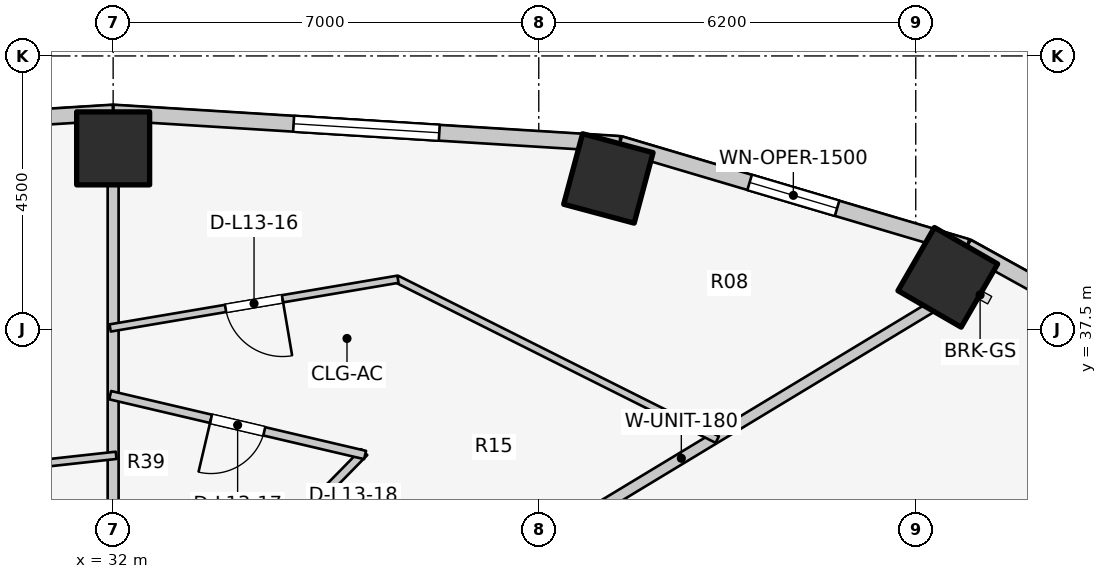
"""IFC4 building model, lengths in metres.
Left out: names, types, materials, properties, quantities, classifications, styles, units other than length and angle.
Written with IfcOpenShell. Run it as: python <this file> out.ifc"""

import sys

from ifc_helpers import new_model, si_unit, direction, frame, frame_2d, origin, origin_2d, place, context, subcontext, project, spatial, rectangle, extrude, element, fill, save


model = new_model("IFC4")
c1 = context("Model", 3, precision=1e-05, world=origin(), true_north=direction((0.0, 1.0)))
c2 = subcontext(c1, "Body", "Model", "MODEL_VIEW")
j1 = project(units=[si_unit("LENGTHUNIT", "METRE"), si_unit("PLANEANGLEUNIT", "RADIAN")], contexts=[c1])
p1 = place(None, origin())
s1 = spatial("IfcSite", under=j1, at=p1, CompositionType="ELEMENT")
p2 = place(p1, origin())
s2 = spatial("IfcBuilding", under=s1, at=p2, CompositionType="ELEMENT")
p3 = place(p2, frame((0.0, 0.0, 46.2)))
s3 = spatial("IfcBuildingStorey", under=s2, at=p3, CompositionType="ELEMENT", Elevation=46.2)
for number, where, z_axis, x_axis in (
    (1, (45.727, 38.359, 0.0), (0.0, 0.0, 1.0), (0.5, 0.866, 0.0)),
    (2, (40.145, 39.986, 0.0), (0.0, 0.0, 1.0), (0.259, 0.966, 0.0)),
    (3, (32.0, 40.48, 0.0), (0.0, 0.0, 1.0), (0.0, 1.0, 0.0)),
):
    element("IfcColumn", number, at=place(p3, frame(where, z_axis=z_axis, x_axis=x_axis)), inside=s3, PredefinedType="COLUMN", context=c2, shape_type="SweptSolid", body=[
        extrude(rectangle(XDim=1.2, YDim=1.2, at=origin_2d()), origin(), (0.0, 0.0, 1.0), 3.1),
    ])
p4 = place(p3, frame((50.405, 36.45, 0.0), z_axis=(0.0, 0.0, 1.0), x_axis=(-0.875137303239, 0.483874674352, 0.0)))
e4 = element("IfcWall", 4, at=p4, inside=s3, PredefinedType="STANDARD", context=c2, shape_type="SweptSolid", body=[
    extrude(rectangle(XDim=4.985, YDim=0.26, at=frame_2d((2.493, 0.0))), origin(), (0.0, 0.0, 1.0), 2.85),
])
p5 = place(p3, frame((46.042, 38.862, 0.0), z_axis=(0.0, 0.0, 1.0), x_axis=(-0.958843593522, 0.283934786811, 0.0)))
e5 = element("IfcWall", 5, at=p5, inside=s3, PredefinedType="STANDARD", context=c2, shape_type="SweptSolid", body=[
    extrude(rectangle(XDim=5.955, YDim=0.26, at=frame_2d((2.978, 0.0))), origin(), (0.0, 0.0, 1.0), 2.85),
])
p6 = place(p5, frame((2.228, 0.0, 0.75)))
e6 = element("IfcOpeningElement", 6, at=p6, cuts=e5, PredefinedType="OPENING", context=c2, shape_type="SweptSolid", body=[
    extrude(rectangle(XDim=1.5, YDim=1.6, at=frame_2d((0.75, 0.8))), frame((0.0, 0.14, 0.0), z_axis=(0.0, -1.0, 0.0), x_axis=(1.0, 0.0, 0.0)), (0.0, 0.0, 1.0), 0.28),
])
p7 = place(p3, frame((40.332, 40.553, 0.0), z_axis=(0.0, 0.0, 1.0), x_axis=(-0.998090514779, 0.061768311519, 0.0)))
e7 = element("IfcWall", 7, at=p7, inside=s3, PredefinedType="STANDARD", context=c2, shape_type="SweptSolid", body=[
    extrude(rectangle(XDim=8.348, YDim=0.26, at=frame_2d((4.174, 0.0))), origin(), (0.0, 0.0, 1.0), 2.85),
])
p8 = place(p7, frame((2.974, 0.0, 0.75)))
e8 = element("IfcOpeningElement", 8, at=p8, cuts=e7, PredefinedType="OPENING", context=c2, shape_type="SweptSolid", body=[
    extrude(rectangle(XDim=2.4, YDim=1.7, at=frame_2d((1.2, 0.85))), frame((0.0, 0.14, 0.0), z_axis=(0.0, -1.0, 0.0), x_axis=(1.0, 0.0, 0.0)), (0.0, 0.0, 1.0), 0.28),
])
p9 = place(p3, frame((32.0, 41.069, 0.0), z_axis=(0.0, 0.0, 1.0), x_axis=(-0.998090514779, -0.061768311519, 0.0)))
e9 = element("IfcWall", 9, at=p9, inside=s3, PredefinedType="STANDARD", context=c2, shape_type="SweptSolid", body=[
    extrude(rectangle(XDim=8.348, YDim=0.26, at=frame_2d((4.174, 0.0))), origin(), (0.0, 0.0, 1.0), 2.85),
])
p10 = place(p9, frame((3.424, 0.0, 0.75)))
e10 = element("IfcOpeningElement", 10, at=p10, cuts=e9, PredefinedType="OPENING", context=c2, shape_type="SweptSolid", body=[
    extrude(rectangle(XDim=1.5, YDim=1.6, at=frame_2d((0.75, 0.8))), frame((0.0, 0.14, 0.0), z_axis=(0.0, -1.0, 0.0), x_axis=(1.0, 0.0, 0.0)), (0.0, 0.0, 1.0), 0.28),
])
p11 = place(p3, frame((37.252, 32.91, 0.0), z_axis=(0.0, 0.0, 1.0), x_axis=(0.855817136021, 0.517278483694, 0.0)))
e11 = element("IfcWall", 11, at=p11, inside=s3, PredefinedType="PARTITIONING", context=c2, shape_type="SweptSolid", body=[
    extrude(rectangle(XDim=9.564, YDim=0.18, at=frame_2d((4.782, 0.0))), origin(), (0.0, 0.0, 1.0), 2.237),
])
p12 = place(p3, frame((32.0, 34.465, 0.0), z_axis=(0.0, 0.0, 1.0), x_axis=(0.0, 1.0, 0.0)))
e12 = element("IfcWall", 12, at=p12, inside=s3, PredefinedType="PARTITIONING", context=c2, shape_type="SweptSolid", body=[
    extrude(rectangle(XDim=5.435, YDim=0.18, at=frame_2d((2.717, 0.0))), origin(), (0.0, 0.0, 1.0), 2.237),
])
p13 = place(p3, frame((41.936, 35.691, 0.0), z_axis=(0.0, 0.0, 1.0), x_axis=(-0.894128783551, 0.447809913274, 0.0)))
e13 = element("IfcWall", 13, at=p13, inside=s3, PredefinedType="MOVABLE", context=c2, shape_type="SweptSolid", body=[
    extrude(rectangle(XDim=5.895, YDim=0.12, at=frame_2d((2.947, 0.0))), origin(), (0.0, 0.0, 1.0), 2.237),
])
p14 = place(p3, frame((36.684, 38.328, 0.0), z_axis=(0.0, 0.0, 1.0), x_axis=(-0.985971487104, -0.166913829921, 0.0)))
e14 = element("IfcWall", 14, at=p14, inside=s3, PredefinedType="MOVABLE", context=c2, shape_type="SweptSolid", body=[
    extrude(rectangle(XDim=4.801, YDim=0.12, at=frame_2d((2.4, 0.0))), origin(), (0.0, 0.0, 1.0), 2.237),
])
p15 = place(p14, frame((1.925, 0.0, 0.0)))
e15 = element("IfcOpeningElement", 15, at=p15, cuts=e14, PredefinedType="OPENING", context=c2, shape_type="SweptSolid", body=[
    extrude(rectangle(XDim=0.95, YDim=2.1, at=frame_2d((0.475, 1.05))), frame((0.0, 0.07, 0.0), z_axis=(0.0, -1.0, 0.0), x_axis=(1.0, 0.0, 0.0)), (0.0, 0.0, 1.0), 0.14),
])
p16 = place(p3, frame((34.659, 33.986, 0.0), z_axis=(0.0, 0.0, 1.0), x_axis=(0.700331728855, 0.713817532398, 0.0)))
e16 = element("IfcWall", 16, at=p16, inside=s3, PredefinedType="PLUMBINGWALL", context=c2, shape_type="SweptSolid", body=[
    extrude(rectangle(XDim=2.1, YDim=0.14, at=frame_2d((1.05, 0.0))), origin(), (0.0, 0.0, 1.0), 2.385),
])
p17 = place(p3, frame((36.144, 35.438, 0.0), z_axis=(0.0, 0.0, 1.0), x_axis=(-0.973546394015, 0.228489427982, 0.0)))
e17 = element("IfcWall", 17, at=p17, inside=s3, PredefinedType="PLUMBINGWALL", context=c2, shape_type="SweptSolid", body=[
    extrude(rectangle(XDim=4.306, YDim=0.14, at=frame_2d((2.153, 0.0))), origin(), (0.0, 0.0, 1.0), 2.237),
])
p18 = place(p17, frame((1.703, 0.0, 0.0)))
e18 = element("IfcOpeningElement", 18, at=p18, cuts=e17, PredefinedType="OPENING", context=c2, shape_type="SweptSolid", body=[
    extrude(rectangle(XDim=0.9, YDim=2.1, at=frame_2d((0.45, 1.05))), frame((0.0, 0.08, 0.0), z_axis=(0.0, -1.0, 0.0), x_axis=(1.0, 0.0, 0.0)), (0.0, 0.0, 1.0), 0.16),
])
p19 = place(p3, frame((32.05, 35.432, 0.0), z_axis=(0.0, 0.0, 1.0), x_axis=(-0.993997647441, -0.109401448263, 0.0)))
e19 = element("IfcWall", 19, at=p19, inside=s3, PredefinedType="MOVABLE", context=c2, shape_type="SweptSolid", body=[
    extrude(rectangle(XDim=3.798, YDim=0.12, at=frame_2d((1.899, 0.0))), origin(), (0.0, 0.0, 1.0), 2.237),
])
p20 = place(p19, frame((1.424, 0.0, 0.0)))
e20 = element("IfcOpeningElement", 20, at=p20, cuts=e19, PredefinedType="OPENING", context=c2, shape_type="SweptSolid", body=[
    extrude(rectangle(XDim=0.95, YDim=2.1, at=frame_2d((0.475, 1.05))), frame((0.0, 0.07, 0.0), z_axis=(0.0, -1.0, 0.0), x_axis=(1.0, 0.0, 0.0)), (0.0, 0.0, 1.0), 0.14),
])
p21 = place(p6, origin())
e21 = element("IfcWindow", 21, at=p21, inside=s3, PartitioningType="SINGLE_PANEL", PredefinedType="WINDOW", context=c2, shape_type="SweptSolid", body=[
    extrude(rectangle(XDim=1.5, YDim=1.6, at=frame_2d((0.75, 0.8))), frame((0.0, 0.03, 0.0), z_axis=(0.0, -1.0, 0.0), x_axis=(1.0, 0.0, 0.0)), (0.0, 0.0, 1.0), 0.06),
])
fill(e6, e21)
p22 = place(p8, origin())
e22 = element("IfcWindow", 22, at=p22, inside=s3, PartitioningType="SINGLE_PANEL", PredefinedType="WINDOW", context=c2, shape_type="SweptSolid", body=[
    extrude(rectangle(XDim=2.4, YDim=1.7, at=frame_2d((1.2, 0.85))), frame((0.0, 0.03, 0.0), z_axis=(0.0, -1.0, 0.0), x_axis=(1.0, 0.0, 0.0)), (0.0, 0.0, 1.0), 0.06),
])
fill(e8, e22)
p23 = place(p15, origin())
e23 = element("IfcDoor", 23, at=p23, inside=s3, OperationType="SINGLE_SWING_LEFT", PredefinedType="DOOR", context=c2, shape_type="SweptSolid", body=[
    extrude(rectangle(XDim=0.95, YDim=2.1, at=frame_2d((0.475, 1.05))), frame((0.0, 0.025, 0.0), z_axis=(0.0, -1.0, 0.0), x_axis=(1.0, 0.0, 0.0)), (0.0, 0.0, 1.0), 0.05),
])
fill(e15, e23)
p24 = place(p18, origin())
e24 = element("IfcDoor", 24, at=p24, inside=s3, OperationType="SINGLE_SWING_RIGHT", PredefinedType="DOOR", context=c2, shape_type="SweptSolid", body=[
    extrude(rectangle(XDim=0.9, YDim=2.1, at=frame_2d((0.45, 1.05))), frame((0.0, 0.025, 0.0), z_axis=(0.0, -1.0, 0.0), x_axis=(1.0, 0.0, 0.0)), (0.0, 0.0, 1.0), 0.05),
])
fill(e18, e24)
save(model, sys.argv[1])
